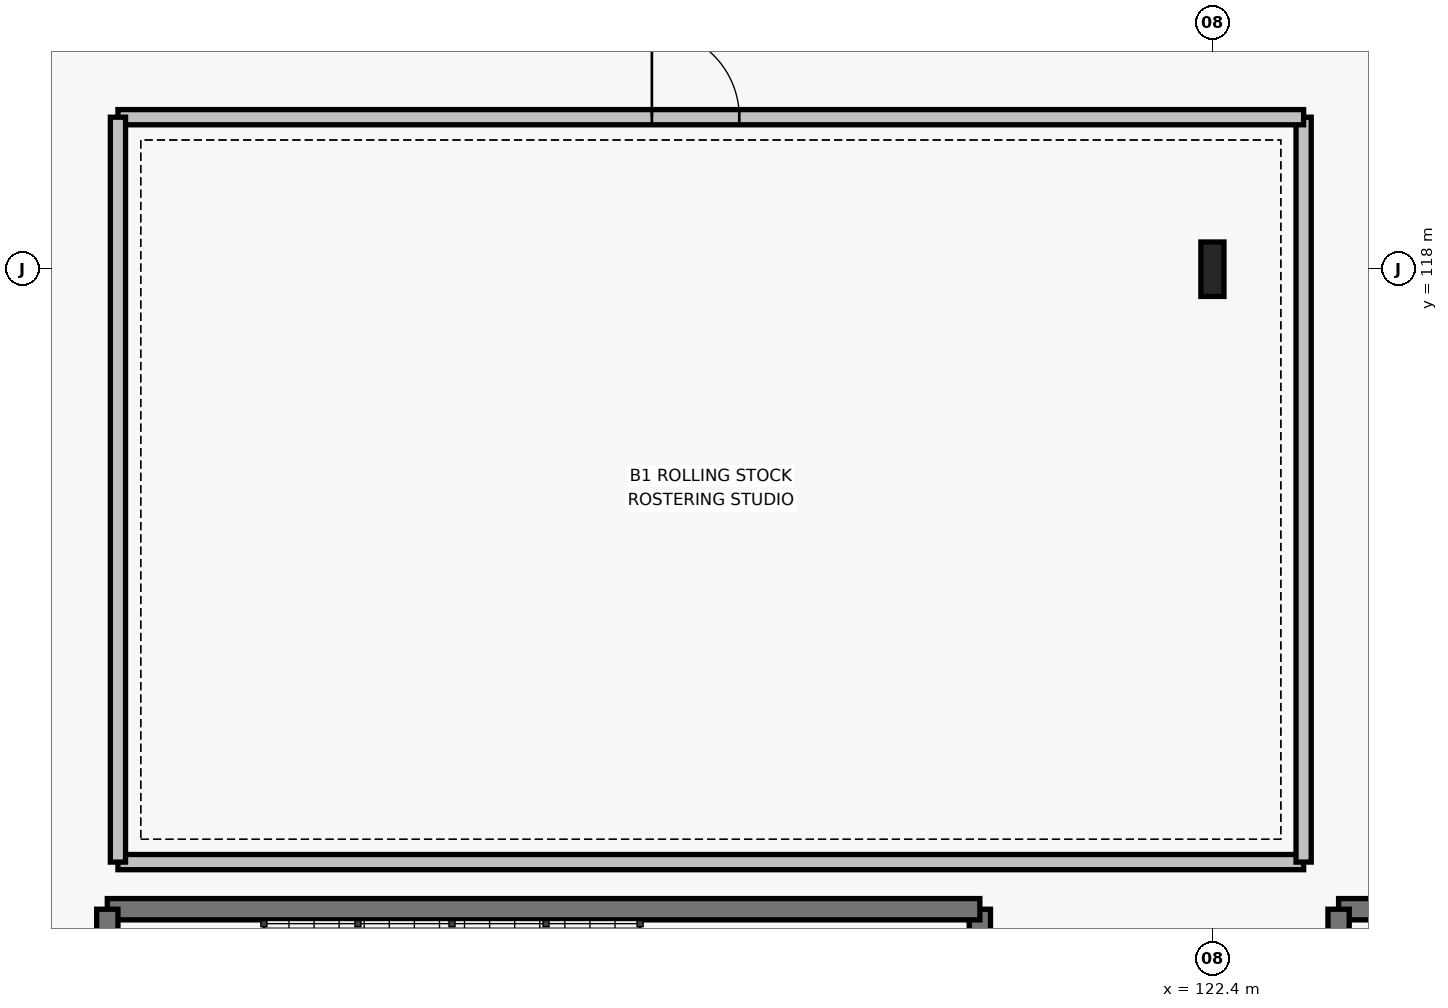
"""IFC4 building model, lengths in metres.
Left out: names, types, materials, properties, quantities, classifications, styles, units other than length and angle.
Written with IfcOpenShell. Run it as: python <this file> out.ifc"""

import sys

from ifc_helpers import new_model, si_unit, direction, frame, frame_2d, origin, origin_2d, place, context, subcontext, project, spatial, rectangle, i_section, extrude, element, fill, save


model = new_model("IFC4")
c1 = context("Model", 3, precision=1e-05, world=origin(), true_north=direction((0.0, 1.0)))
c2 = subcontext(c1, "Body", "Model", "MODEL_VIEW")
j1 = project(units=[si_unit("LENGTHUNIT", "METRE"), si_unit("PLANEANGLEUNIT", "RADIAN")], contexts=[c1])
p1 = place(None, origin())
s1 = spatial("IfcSite", under=j1, at=p1, CompositionType="ELEMENT")
p2 = place(p1, origin())
s2 = spatial("IfcBuilding", under=s1, at=p2, CompositionType="ELEMENT")
p3 = place(p2, frame((0.0, 0.0, -6.0)))
s3 = spatial("IfcBuildingStorey", under=s2, at=p3, CompositionType="ELEMENT", Elevation=-6.0)
p4 = place(p3, frame((122.4, 118.0, 0.0), z_axis=(0.0, 0.0, 1.0), x_axis=(1.0, 0.0, 0.0)))
e1 = element("IfcColumn", 1, at=p4, inside=s3, PredefinedType="COLUMN", context=c2, shape_type="SweptSolid", body=[
    extrude(i_section(OverallWidth=0.304, OverallDepth=0.716, WebThickness=0.021, FlangeThickness=0.04, FilletRadius=0.027, at=origin_2d()), origin(), (0.0, 0.0, 1.0), 6.0),
])
p5 = place(p3, frame((119.34, 105.26, 0.0), z_axis=(0.0, 0.0, 1.0), x_axis=(0.0, 1.0, 0.0)))
e2 = element("IfcWall", 2, at=p5, inside=s3, PredefinedType="SHEAR", context=c2, shape_type="SweptSolid", body=[
    extrude(rectangle(XDim=4.32, YDim=0.28, at=frame_2d((2.16, 0.0))), origin(), (0.0, 0.0, 1.0), 5.76),
])
p6 = place(p3, frame((119.34, 109.58, 0.0), z_axis=(0.0, 0.0, 1.0), x_axis=(-1.0, 0.0, 0.0)))
e3 = element("IfcWall", 3, at=p6, inside=s3, PredefinedType="SHEAR", context=c2, shape_type="SweptSolid", body=[
    extrude(rectangle(XDim=11.48, YDim=0.28, at=frame_2d((5.74, 0.0))), origin(), (0.0, 0.0, 1.0), 5.76),
])
p7 = place(p3, frame((107.86, 109.58, 0.0), z_axis=(0.0, 0.0, 1.0), x_axis=(0.0, -1.0, 0.0)))
e4 = element("IfcWall", 4, at=p7, inside=s3, PredefinedType="SHEAR", context=c2, shape_type="SweptSolid", body=[
    extrude(rectangle(XDim=4.32, YDim=0.28, at=frame_2d((2.16, 0.0))), origin(), (0.0, 0.0, 1.0), 5.76),
])
p8 = place(p7, frame((1.585, 0.0, 0.0)))
e5 = element("IfcOpeningElement", 5, at=p8, cuts=e4, PredefinedType="OPENING", context=c2, shape_type="SweptSolid", body=[
    extrude(rectangle(XDim=1.15, YDim=2.2, at=frame_2d((0.575, 1.1))), frame((0.0, 0.15, 0.0), z_axis=(0.0, -1.0, 0.0), x_axis=(1.0, 0.0, 0.0)), (0.0, 0.0, 1.0), 0.3),
])
p9 = place(p3, frame((135.54, 109.58, 0.0), z_axis=(0.0, 0.0, 1.0), x_axis=(-1.0, 0.0, 0.0)))
e6 = element("IfcWall", 6, at=p9, inside=s3, PredefinedType="SHEAR", context=c2, shape_type="SweptSolid", body=[
    extrude(rectangle(XDim=11.48, YDim=0.28, at=frame_2d((5.74, 0.0))), origin(), (0.0, 0.0, 1.0), 5.76),
])
p10 = place(p3, frame((124.06, 109.58, 0.0), z_axis=(0.0, 0.0, 1.0), x_axis=(0.0, -1.0, 0.0)))
e7 = element("IfcWall", 7, at=p10, inside=s3, PredefinedType="SHEAR", context=c2, shape_type="SweptSolid", body=[
    extrude(rectangle(XDim=4.32, YDim=0.28, at=frame_2d((2.16, 0.0))), origin(), (0.0, 0.0, 1.0), 5.76),
])
p11 = place(p10, frame((1.585, 0.0, 0.0)))
e8 = element("IfcOpeningElement", 8, at=p11, cuts=e7, PredefinedType="OPENING", context=c2, shape_type="SweptSolid", body=[
    extrude(rectangle(XDim=1.15, YDim=2.2, at=frame_2d((0.575, 1.1))), frame((0.0, 0.15, 0.0), z_axis=(0.0, -1.0, 0.0), x_axis=(1.0, 0.0, 0.0)), (0.0, 0.0, 1.0), 0.3),
])
p12 = place(p3, frame((108.0, 110.2, 0.0), z_axis=(0.0, 0.0, 1.0), x_axis=(1.0, 0.0, 0.0)))
e9 = element("IfcWall", 9, at=p12, inside=s3, PredefinedType="PARTITIONING", context=c2, shape_type="SweptSolid", body=[
    extrude(rectangle(XDim=15.6, YDim=0.2, at=frame_2d((7.8, 0.0))), origin(), (0.0, 0.0, 1.0), 5.75),
])
p13 = place(p3, frame((123.6, 110.2, 0.0), z_axis=(0.0, 0.0, 1.0), x_axis=(0.0, 1.0, 0.0)))
e10 = element("IfcWall", 10, at=p13, inside=s3, PredefinedType="PARTITIONING", context=c2, shape_type="SweptSolid", body=[
    extrude(rectangle(XDim=9.8, YDim=0.2, at=frame_2d((4.9, 0.0))), origin(), (0.0, 0.0, 1.0), 5.75),
])
p14 = place(p3, frame((123.6, 120.0, 0.0), z_axis=(0.0, 0.0, 1.0), x_axis=(-1.0, 0.0, 0.0)))
e11 = element("IfcWall", 11, at=p14, inside=s3, PredefinedType="PARTITIONING", context=c2, shape_type="SweptSolid", body=[
    extrude(rectangle(XDim=15.6, YDim=0.2, at=frame_2d((7.8, 0.0))), origin(), (0.0, 0.0, 1.0), 5.75),
])
p15 = place(p14, frame((7.425, 0.0, 0.0)))
e12 = element("IfcOpeningElement", 12, at=p15, cuts=e11, PredefinedType="OPENING", context=c2, shape_type="SweptSolid", body=[
    extrude(rectangle(XDim=1.15, YDim=2.2, at=frame_2d((0.575, 1.1))), frame((0.0, 0.11, 0.0), z_axis=(0.0, -1.0, 0.0), x_axis=(1.0, 0.0, 0.0)), (0.0, 0.0, 1.0), 0.22),
])
p16 = place(p3, frame((108.0, 120.0, 0.0), z_axis=(0.0, 0.0, 1.0), x_axis=(0.0, -1.0, 0.0)))
e13 = element("IfcWall", 13, at=p16, inside=s3, PredefinedType="PARTITIONING", context=c2, shape_type="SweptSolid", body=[
    extrude(rectangle(XDim=9.8, YDim=0.2, at=frame_2d((4.9, 0.0))), origin(), (0.0, 0.0, 1.0), 5.75),
])
p17 = place(p15, origin())
e14 = element("IfcDoor", 14, at=p17, inside=s3, OperationType="SINGLE_SWING_RIGHT", PredefinedType="DOOR", context=c2, shape_type="SweptSolid", body=[
    extrude(rectangle(XDim=1.15, YDim=2.2, at=frame_2d((0.575, 1.1))), frame((0.0, 0.025, 0.0), z_axis=(0.0, -1.0, 0.0), x_axis=(1.0, 0.0, 0.0)), (0.0, 0.0, 1.0), 0.05),
])
fill(e12, e14)
save(model, sys.argv[1])
